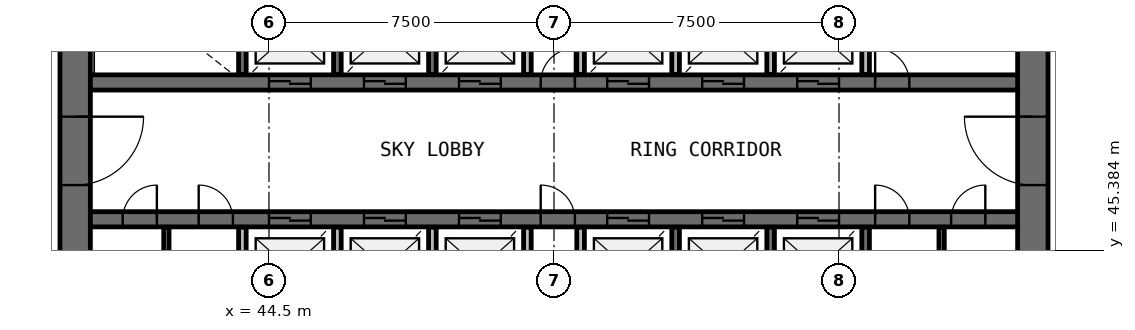
"""IFC4 building model, lengths in metres.
Left out: names, types, materials, properties, quantities, classifications, styles, units other than length and angle.
Written with IfcOpenShell. Run it as: python <this file> out.ifc"""

import sys

from ifc_helpers import new_model, si_unit, direction, frame, frame_2d, origin, place, context, subcontext, project, spatial, rectangle, extrude, source, transform, mapped, element, fill, save


model = new_model("IFC4")
c1 = context("Model", 3, precision=1e-05, world=origin(), true_north=direction((0.0, 1.0)))
c2 = subcontext(c1, "Body", "Model", "MODEL_VIEW")
j1 = project(units=[si_unit("LENGTHUNIT", "METRE"), si_unit("PLANEANGLEUNIT", "RADIAN")], contexts=[c1])
p1 = place(None, origin())
s1 = spatial("IfcSite", under=j1, at=p1, CompositionType="ELEMENT")
p2 = place(p1, origin())
s2 = spatial("IfcBuilding", under=s1, at=p2, CompositionType="ELEMENT")
p3 = place(p2, frame((0.0, 0.0, 133.1)))
s3 = spatial("IfcBuildingStorey", under=s2, at=p3, CompositionType="ELEMENT", Elevation=133.1)
p4 = place(p3, frame((64.6, 38.0, 0.0), z_axis=(0.0, 0.0, 1.0), x_axis=(0.0, 1.0, 0.0)))
e1 = element("IfcWall", 1, at=p4, inside=s3, PredefinedType="SHEAR", context=c2, shape_type="SweptSolid", body=[
    extrude(rectangle(XDim=20.0, YDim=0.8, at=frame_2d((10.0, 0.0))), origin(), (0.0, 0.0, 1.0), 3.9),
])
p5 = place(p4, frame((9.1, 0.0, 0.0)))
e2 = element("IfcOpeningElement", 2, at=p5, cuts=e1, PredefinedType="OPENING", context=c2, shape_type="SweptSolid", body=[
    extrude(rectangle(XDim=1.8, YDim=2.1, at=frame_2d((0.9, 1.05))), frame((0.0, 0.41, 0.0), z_axis=(0.0, -1.0, 0.0), x_axis=(1.0, 0.0, 0.0)), (0.0, 0.0, 1.0), 0.82),
])
p6 = place(p3, frame((39.4, 58.0, 0.0), z_axis=(0.0, 0.0, 1.0), x_axis=(0.0, -1.0, 0.0)))
e3 = element("IfcWall", 3, at=p6, inside=s3, PredefinedType="SHEAR", context=c2, shape_type="SweptSolid", body=[
    extrude(rectangle(XDim=20.0, YDim=0.8, at=frame_2d((10.0, 0.0))), origin(), (0.0, 0.0, 1.0), 3.9),
])
p7 = place(p6, frame((9.1, 0.0, 0.0)))
e4 = element("IfcOpeningElement", 4, at=p7, cuts=e3, PredefinedType="OPENING", context=c2, shape_type="SweptSolid", body=[
    extrude(rectangle(XDim=1.8, YDim=2.1, at=frame_2d((0.9, 1.05))), frame((0.0, 0.41, 0.0), z_axis=(0.0, -1.0, 0.0), x_axis=(1.0, 0.0, 0.0)), (0.0, 0.0, 1.0), 0.82),
])
p8 = place(p3, frame((39.8, 49.8, 0.0), z_axis=(0.0, 0.0, 1.0), x_axis=(1.0, 0.0, 0.0)))
e5 = element("IfcWall", 5, at=p8, inside=s3, PredefinedType="SHEAR", context=c2, shape_type="SweptSolid", body=[
    extrude(rectangle(XDim=24.4, YDim=0.4, at=frame_2d((12.2, 0.0))), origin(), (0.0, 0.0, 1.0), 3.9),
])
p9 = place(p8, frame((13.6, 0.0, 0.0)))
e6 = element("IfcOpeningElement", 6, at=p9, cuts=e5, PredefinedType="OPENING", context=c2, shape_type="SweptSolid", body=[
    extrude(rectangle(XDim=1.1, YDim=2.1, at=frame_2d((0.55, 1.05))), frame((0.0, 0.21, 0.0), z_axis=(0.0, -1.0, 0.0), x_axis=(1.0, 0.0, 0.0)), (0.0, 0.0, 1.0), 0.42),
])
p10 = place(p8, frame((16.1, 0.0, 0.0)))
e7 = element("IfcOpeningElement", 7, at=p10, cuts=e5, PredefinedType="OPENING", context=c2, shape_type="SweptSolid", body=[
    extrude(rectangle(XDim=1.1, YDim=2.1, at=frame_2d((0.55, 1.05))), frame((0.0, 0.21, 0.0), z_axis=(0.0, -1.0, 0.0), x_axis=(1.0, 0.0, 0.0)), (0.0, 0.0, 1.0), 0.42),
])
p11 = place(p8, frame((18.6, 0.0, 0.0)))
e8 = element("IfcOpeningElement", 8, at=p11, cuts=e5, PredefinedType="OPENING", context=c2, shape_type="SweptSolid", body=[
    extrude(rectangle(XDim=1.1, YDim=2.1, at=frame_2d((0.55, 1.05))), frame((0.0, 0.21, 0.0), z_axis=(0.0, -1.0, 0.0), x_axis=(1.0, 0.0, 0.0)), (0.0, 0.0, 1.0), 0.42),
])
p12 = place(p8, frame((4.7, 0.0, 0.0)))
e9 = element("IfcOpeningElement", 9, at=p12, cuts=e5, PredefinedType="OPENING", context=c2, shape_type="SweptSolid", body=[
    extrude(rectangle(XDim=1.1, YDim=2.1, at=frame_2d((0.55, 1.05))), frame((0.0, 0.21, 0.0), z_axis=(0.0, -1.0, 0.0), x_axis=(1.0, 0.0, 0.0)), (0.0, 0.0, 1.0), 0.42),
])
p13 = place(p8, frame((7.2, 0.0, 0.0)))
e10 = element("IfcOpeningElement", 10, at=p13, cuts=e5, PredefinedType="OPENING", context=c2, shape_type="SweptSolid", body=[
    extrude(rectangle(XDim=1.1, YDim=2.1, at=frame_2d((0.55, 1.05))), frame((0.0, 0.21, 0.0), z_axis=(0.0, -1.0, 0.0), x_axis=(1.0, 0.0, 0.0)), (0.0, 0.0, 1.0), 0.42),
])
p14 = place(p8, frame((9.7, 0.0, 0.0)))
e11 = element("IfcOpeningElement", 11, at=p14, cuts=e5, PredefinedType="OPENING", context=c2, shape_type="SweptSolid", body=[
    extrude(rectangle(XDim=1.1, YDim=2.1, at=frame_2d((0.55, 1.05))), frame((0.0, 0.21, 0.0), z_axis=(0.0, -1.0, 0.0), x_axis=(1.0, 0.0, 0.0)), (0.0, 0.0, 1.0), 0.42),
])
p15 = place(p8, frame((20.65, 0.0, 0.0)))
e12 = element("IfcOpeningElement", 12, at=p15, cuts=e5, PredefinedType="OPENING", context=c2, shape_type="SweptSolid", body=[
    extrude(rectangle(XDim=0.9, YDim=2.1, at=frame_2d((0.45, 1.05))), frame((0.0, 0.21, 0.0), z_axis=(0.0, -1.0, 0.0), x_axis=(1.0, 0.0, 0.0)), (0.0, 0.0, 1.0), 0.42),
])
p16 = place(p8, frame((11.85, 0.0, 0.0)))
e13 = element("IfcOpeningElement", 13, at=p16, cuts=e5, PredefinedType="OPENING", context=c2, shape_type="SweptSolid", body=[
    extrude(rectangle(XDim=0.9, YDim=2.1, at=frame_2d((0.45, 1.05))), frame((0.0, 0.21, 0.0), z_axis=(0.0, -1.0, 0.0), x_axis=(1.0, 0.0, 0.0)), (0.0, 0.0, 1.0), 0.42),
])
p17 = place(p3, frame((39.8, 46.2, 0.0), z_axis=(0.0, 0.0, 1.0), x_axis=(1.0, 0.0, 0.0)))
e14 = element("IfcWall", 14, at=p17, inside=s3, PredefinedType="SHEAR", context=c2, shape_type="SweptSolid", body=[
    extrude(rectangle(XDim=24.4, YDim=0.4, at=frame_2d((12.2, 0.0))), origin(), (0.0, 0.0, 1.0), 3.9),
])
p18 = place(p17, frame((13.6, 0.0, 0.0)))
e15 = element("IfcOpeningElement", 15, at=p18, cuts=e14, PredefinedType="OPENING", context=c2, shape_type="SweptSolid", body=[
    extrude(rectangle(XDim=1.1, YDim=2.1, at=frame_2d((0.55, 1.05))), frame((0.0, 0.21, 0.0), z_axis=(0.0, -1.0, 0.0), x_axis=(1.0, 0.0, 0.0)), (0.0, 0.0, 1.0), 0.42),
])
p19 = place(p17, frame((16.1, 0.0, 0.0)))
e16 = element("IfcOpeningElement", 16, at=p19, cuts=e14, PredefinedType="OPENING", context=c2, shape_type="SweptSolid", body=[
    extrude(rectangle(XDim=1.1, YDim=2.1, at=frame_2d((0.55, 1.05))), frame((0.0, 0.21, 0.0), z_axis=(0.0, -1.0, 0.0), x_axis=(1.0, 0.0, 0.0)), (0.0, 0.0, 1.0), 0.42),
])
p20 = place(p17, frame((18.6, 0.0, 0.0)))
e17 = element("IfcOpeningElement", 17, at=p20, cuts=e14, PredefinedType="OPENING", context=c2, shape_type="SweptSolid", body=[
    extrude(rectangle(XDim=1.1, YDim=2.1, at=frame_2d((0.55, 1.05))), frame((0.0, 0.21, 0.0), z_axis=(0.0, -1.0, 0.0), x_axis=(1.0, 0.0, 0.0)), (0.0, 0.0, 1.0), 0.42),
])
p21 = place(p17, frame((4.7, 0.0, 0.0)))
e18 = element("IfcOpeningElement", 18, at=p21, cuts=e14, PredefinedType="OPENING", context=c2, shape_type="SweptSolid", body=[
    extrude(rectangle(XDim=1.1, YDim=2.1, at=frame_2d((0.55, 1.05))), frame((0.0, 0.21, 0.0), z_axis=(0.0, -1.0, 0.0), x_axis=(1.0, 0.0, 0.0)), (0.0, 0.0, 1.0), 0.42),
])
p22 = place(p17, frame((7.2, 0.0, 0.0)))
e19 = element("IfcOpeningElement", 19, at=p22, cuts=e14, PredefinedType="OPENING", context=c2, shape_type="SweptSolid", body=[
    extrude(rectangle(XDim=1.1, YDim=2.1, at=frame_2d((0.55, 1.05))), frame((0.0, 0.21, 0.0), z_axis=(0.0, -1.0, 0.0), x_axis=(1.0, 0.0, 0.0)), (0.0, 0.0, 1.0), 0.42),
])
p23 = place(p17, frame((9.7, 0.0, 0.0)))
e20 = element("IfcOpeningElement", 20, at=p23, cuts=e14, PredefinedType="OPENING", context=c2, shape_type="SweptSolid", body=[
    extrude(rectangle(XDim=1.1, YDim=2.1, at=frame_2d((0.55, 1.05))), frame((0.0, 0.21, 0.0), z_axis=(0.0, -1.0, 0.0), x_axis=(1.0, 0.0, 0.0)), (0.0, 0.0, 1.0), 0.42),
])
p24 = place(p17, frame((20.65, 0.0, 0.0)))
e21 = element("IfcOpeningElement", 21, at=p24, cuts=e14, PredefinedType="OPENING", context=c2, shape_type="SweptSolid", body=[
    extrude(rectangle(XDim=0.9, YDim=2.1, at=frame_2d((0.45, 1.05))), frame((0.0, 0.21, 0.0), z_axis=(0.0, -1.0, 0.0), x_axis=(1.0, 0.0, 0.0)), (0.0, 0.0, 1.0), 0.42),
])
p25 = place(p17, frame((22.65, 0.0, 0.0)))
e22 = element("IfcOpeningElement", 22, at=p25, cuts=e14, PredefinedType="OPENING", context=c2, shape_type="SweptSolid", body=[
    extrude(rectangle(XDim=0.9, YDim=2.1, at=frame_2d((0.45, 1.05))), frame((0.0, 0.21, 0.0), z_axis=(0.0, -1.0, 0.0), x_axis=(1.0, 0.0, 0.0)), (0.0, 0.0, 1.0), 0.42),
])
p26 = place(p17, frame((0.85, 0.0, 0.0)))
e23 = element("IfcOpeningElement", 23, at=p26, cuts=e14, PredefinedType="OPENING", context=c2, shape_type="SweptSolid", body=[
    extrude(rectangle(XDim=0.9, YDim=2.1, at=frame_2d((0.45, 1.05))), frame((0.0, 0.21, 0.0), z_axis=(0.0, -1.0, 0.0), x_axis=(1.0, 0.0, 0.0)), (0.0, 0.0, 1.0), 0.42),
])
p27 = place(p17, frame((2.85, 0.0, 0.0)))
e24 = element("IfcOpeningElement", 24, at=p27, cuts=e14, PredefinedType="OPENING", context=c2, shape_type="SweptSolid", body=[
    extrude(rectangle(XDim=0.9, YDim=2.1, at=frame_2d((0.45, 1.05))), frame((0.0, 0.21, 0.0), z_axis=(0.0, -1.0, 0.0), x_axis=(1.0, 0.0, 0.0)), (0.0, 0.0, 1.0), 0.42),
])
p28 = place(p17, frame((11.85, 0.0, 0.0)))
e25 = element("IfcOpeningElement", 25, at=p28, cuts=e14, PredefinedType="OPENING", context=c2, shape_type="SweptSolid", body=[
    extrude(rectangle(XDim=0.9, YDim=2.1, at=frame_2d((0.45, 1.05))), frame((0.0, 0.21, 0.0), z_axis=(0.0, -1.0, 0.0), x_axis=(1.0, 0.0, 0.0)), (0.0, 0.0, 1.0), 0.42),
])
for number, where, z_axis, x_axis in (
    (26, (43.8, 45.99, 0.0), (0.0, 0.0, 1.0), (0.0, -1.0, 0.0)),
    (27, (43.8, 52.37, 0.0), (0.0, 0.0, 1.0), (0.0, -1.0, 0.0)),
):
    element("IfcWall", number, at=place(p3, frame(where, z_axis=z_axis, x_axis=x_axis)), inside=s3, PredefinedType="SOLIDWALL", context=c2, shape_type="SweptSolid", body=[
        extrude(rectangle(XDim=2.36, YDim=0.2, at=frame_2d((1.18, 0.0))), origin(), (0.0, 0.0, 1.0), 3.58),
    ])
p29 = place(p3, frame((46.3, 43.6, 0.0), z_axis=(0.0, 0.0, 1.0), x_axis=(0.0, 1.0, 0.0)))
e28 = element("IfcWall", 28, at=p29, inside=s3, PredefinedType="SOLIDWALL", context=c2, shape_type="SweptSolid", body=[
    extrude(rectangle(XDim=2.39, YDim=0.2, at=frame_2d((1.195, 0.0))), origin(), (0.0, 0.0, 1.0), 3.58),
])
for number, where, z_axis, x_axis in (
    (29, (46.3, 50.01, 0.0), (0.0, 0.0, 1.0), (0.0, 1.0, 0.0)),
    (30, (48.8, 43.63, 0.0), (0.0, 0.0, 1.0), (0.0, 1.0, 0.0)),
    (31, (48.8, 50.01, 0.0), (0.0, 0.0, 1.0), (0.0, 1.0, 0.0)),
    (32, (51.3, 43.63, 0.0), (0.0, 0.0, 1.0), (0.0, 1.0, 0.0)),
):
    element("IfcWall", number, at=place(p3, frame(where, z_axis=z_axis, x_axis=x_axis)), inside=s3, PredefinedType="SOLIDWALL", context=c2, shape_type="SweptSolid", body=[
        extrude(rectangle(XDim=2.36, YDim=0.2, at=frame_2d((1.18, 0.0))), origin(), (0.0, 0.0, 1.0), 3.58),
    ])
for number, where, z_axis, x_axis in (
    (33, (51.3, 50.01, 0.0), (0.0, 0.0, 1.0), (0.0, 1.0, 0.0)),
    (34, (52.7, 45.99, 0.0), (0.0, 0.0, 1.0), (0.0, -1.0, 0.0)),
):
    element("IfcWall", number, at=place(p3, frame(where, z_axis=z_axis, x_axis=x_axis)), inside=s3, PredefinedType="SOLIDWALL", context=c2, shape_type="SweptSolid", body=[
        extrude(rectangle(XDim=2.39, YDim=0.2, at=frame_2d((1.195, 0.0))), origin(), (0.0, 0.0, 1.0), 3.58),
    ])
for number, where, z_axis, x_axis in (
    (35, (52.7, 52.37, 0.0), (0.0, 0.0, 1.0), (0.0, -1.0, 0.0)),
    (36, (55.2, 43.63, 0.0), (0.0, 0.0, 1.0), (0.0, 1.0, 0.0)),
    (37, (55.2, 50.01, 0.0), (0.0, 0.0, 1.0), (0.0, 1.0, 0.0)),
    (38, (57.7, 43.63, 0.0), (0.0, 0.0, 1.0), (0.0, 1.0, 0.0)),
):
    element("IfcWall", number, at=place(p3, frame(where, z_axis=z_axis, x_axis=x_axis)), inside=s3, PredefinedType="SOLIDWALL", context=c2, shape_type="SweptSolid", body=[
        extrude(rectangle(XDim=2.36, YDim=0.2, at=frame_2d((1.18, 0.0))), origin(), (0.0, 0.0, 1.0), 3.58),
    ])
p30 = place(p3, frame((57.7, 50.01, 0.0), z_axis=(0.0, 0.0, 1.0), x_axis=(0.0, 1.0, 0.0)))
e39 = element("IfcWall", 39, at=p30, inside=s3, PredefinedType="SOLIDWALL", context=c2, shape_type="SweptSolid", body=[
    extrude(rectangle(XDim=2.39, YDim=0.2, at=frame_2d((1.195, 0.0))), origin(), (0.0, 0.0, 1.0), 3.58),
])
for number, where, z_axis, x_axis in (
    (40, (60.2, 43.63, 0.0), (0.0, 0.0, 1.0), (0.0, 1.0, 0.0)),
    (41, (60.2, 50.01, 0.0), (0.0, 0.0, 1.0), (0.0, 1.0, 0.0)),
):
    element("IfcWall", number, at=place(p3, frame(where, z_axis=z_axis, x_axis=x_axis)), inside=s3, PredefinedType="SOLIDWALL", context=c2, shape_type="SweptSolid", body=[
        extrude(rectangle(XDim=2.36, YDim=0.2, at=frame_2d((1.18, 0.0))), origin(), (0.0, 0.0, 1.0), 3.58),
    ])
for number, where, z_axis, x_axis in (
    (42, (41.8, 43.6, 0.0), (0.0, 0.0, 1.0), (0.0, 1.0, 0.0)),
    (43, (62.2, 43.6, 0.0), (0.0, 0.0, 1.0), (0.0, 1.0, 0.0)),
):
    element("IfcWall", number, at=place(p3, frame(where, z_axis=z_axis, x_axis=x_axis)), inside=s3, PredefinedType="PARTITIONING", context=c2, shape_type="SweptSolid", body=[
        extrude(rectangle(XDim=2.39, YDim=0.14, at=frame_2d((1.195, 0.0))), origin(), (0.0, 0.0, 1.0), 2.88),
    ])
m1 = source(origin(), c2, "Body", "SweptSolid", [
    extrude(rectangle(XDim=1.8, YDim=2.1, at=frame_2d((0.9, 1.05))), frame((0.0, 0.025, 0.0), z_axis=(0.0, -1.0, 0.0), x_axis=(1.0, 0.0, 0.0)), (0.0, 0.0, 1.0), 0.05),
])
p31 = place(p7, origin())
e44 = element("IfcDoor", 44, at=p31, inside=s3, OperationType="SINGLE_SWING_LEFT", PredefinedType="DOOR", context=c2, shape_type="MappedRepresentation", body=[
    mapped(m1, transform((0.0, 0.0, 0.0), scale=1.0)),
])
fill(e4, e44)
p32 = place(p5, origin())
e45 = element("IfcDoor", 45, at=p32, inside=s3, OperationType="SINGLE_SWING_RIGHT", PredefinedType="DOOR", context=c2, shape_type="MappedRepresentation", body=[
    mapped(m1, transform((0.0, 0.0, 0.0), scale=1.0)),
])
fill(e2, e45)
m2 = source(origin(), c2, "Body", "SweptSolid", [
    extrude(rectangle(XDim=1.1, YDim=2.1, at=frame_2d((0.55, 1.05))), frame((0.0, 0.025, 0.0), z_axis=(0.0, -1.0, 0.0), x_axis=(1.0, 0.0, 0.0)), (0.0, 0.0, 1.0), 0.05),
])
p33 = place(p9, origin())
e46 = element("IfcDoor", 46, at=p33, inside=s3, OperationType="DOUBLE_DOOR_SLIDING", PredefinedType="USERDEFINED", context=c2, shape_type="MappedRepresentation", body=[
    mapped(m2, transform((0.0, 0.0, 0.0), scale=1.0)),
])
fill(e6, e46)
p34 = place(p10, origin())
e47 = element("IfcDoor", 47, at=p34, inside=s3, OperationType="DOUBLE_DOOR_SLIDING", PredefinedType="USERDEFINED", context=c2, shape_type="MappedRepresentation", body=[
    mapped(m2, transform((0.0, 0.0, 0.0), scale=1.0)),
])
fill(e7, e47)
p35 = place(p11, origin())
e48 = element("IfcDoor", 48, at=p35, inside=s3, OperationType="DOUBLE_DOOR_SLIDING", PredefinedType="USERDEFINED", context=c2, shape_type="MappedRepresentation", body=[
    mapped(m2, transform((0.0, 0.0, 0.0), scale=1.0)),
])
fill(e8, e48)
p36 = place(p18, origin())
e49 = element("IfcDoor", 49, at=p36, inside=s3, OperationType="DOUBLE_DOOR_SLIDING", PredefinedType="USERDEFINED", context=c2, shape_type="MappedRepresentation", body=[
    mapped(m2, transform((0.0, 0.0, 0.0), scale=1.0)),
])
fill(e15, e49)
p37 = place(p19, origin())
e50 = element("IfcDoor", 50, at=p37, inside=s3, OperationType="DOUBLE_DOOR_SLIDING", PredefinedType="USERDEFINED", context=c2, shape_type="MappedRepresentation", body=[
    mapped(m2, transform((0.0, 0.0, 0.0), scale=1.0)),
])
fill(e16, e50)
p38 = place(p20, origin())
e51 = element("IfcDoor", 51, at=p38, inside=s3, OperationType="DOUBLE_DOOR_SLIDING", PredefinedType="USERDEFINED", context=c2, shape_type="MappedRepresentation", body=[
    mapped(m2, transform((0.0, 0.0, 0.0), scale=1.0)),
])
fill(e17, e51)
p39 = place(p12, origin())
e52 = element("IfcDoor", 52, at=p39, inside=s3, OperationType="DOUBLE_DOOR_SLIDING", PredefinedType="USERDEFINED", context=c2, shape_type="MappedRepresentation", body=[
    mapped(m2, transform((0.0, 0.0, 0.0), scale=1.0)),
])
fill(e9, e52)
p40 = place(p13, origin())
e53 = element("IfcDoor", 53, at=p40, inside=s3, OperationType="DOUBLE_DOOR_SLIDING", PredefinedType="USERDEFINED", context=c2, shape_type="MappedRepresentation", body=[
    mapped(m2, transform((0.0, 0.0, 0.0), scale=1.0)),
])
fill(e10, e53)
p41 = place(p14, origin())
e54 = element("IfcDoor", 54, at=p41, inside=s3, OperationType="DOUBLE_DOOR_SLIDING", PredefinedType="USERDEFINED", context=c2, shape_type="MappedRepresentation", body=[
    mapped(m2, transform((0.0, 0.0, 0.0), scale=1.0)),
])
fill(e11, e54)
p42 = place(p21, origin())
e55 = element("IfcDoor", 55, at=p42, inside=s3, OperationType="DOUBLE_DOOR_SLIDING", PredefinedType="USERDEFINED", context=c2, shape_type="MappedRepresentation", body=[
    mapped(m2, transform((0.0, 0.0, 0.0), scale=1.0)),
])
fill(e18, e55)
p43 = place(p22, origin())
e56 = element("IfcDoor", 56, at=p43, inside=s3, OperationType="DOUBLE_DOOR_SLIDING", PredefinedType="USERDEFINED", context=c2, shape_type="MappedRepresentation", body=[
    mapped(m2, transform((0.0, 0.0, 0.0), scale=1.0)),
])
fill(e19, e56)
p44 = place(p23, origin())
e57 = element("IfcDoor", 57, at=p44, inside=s3, OperationType="DOUBLE_DOOR_SLIDING", PredefinedType="USERDEFINED", context=c2, shape_type="MappedRepresentation", body=[
    mapped(m2, transform((0.0, 0.0, 0.0), scale=1.0)),
])
fill(e20, e57)
m3 = source(origin(), c2, "Body", "SweptSolid", [
    extrude(rectangle(XDim=0.9, YDim=2.1, at=frame_2d((0.45, 1.05))), frame((0.0, 0.025, 0.0), z_axis=(0.0, -1.0, 0.0), x_axis=(1.0, 0.0, 0.0)), (0.0, 0.0, 1.0), 0.05),
])
p45 = place(p24, origin())
e58 = element("IfcDoor", 58, at=p45, inside=s3, OperationType="SINGLE_SWING_LEFT", PredefinedType="DOOR", context=c2, shape_type="MappedRepresentation", body=[
    mapped(m3, transform((0.0, 0.0, 0.0), scale=1.0)),
])
fill(e21, e58)
p46 = place(p25, origin())
e59 = element("IfcDoor", 59, at=p46, inside=s3, OperationType="SINGLE_SWING_RIGHT", PredefinedType="DOOR", context=c2, shape_type="MappedRepresentation", body=[
    mapped(m3, transform((0.0, 0.0, 0.0), scale=1.0)),
])
fill(e22, e59)
p47 = place(p15, origin())
e60 = element("IfcDoor", 60, at=p47, inside=s3, OperationType="SINGLE_SWING_LEFT", PredefinedType="DOOR", context=c2, shape_type="MappedRepresentation", body=[
    mapped(m3, transform((0.0, 0.0, 0.0), scale=1.0)),
])
fill(e12, e60)
p48 = place(p26, origin())
e61 = element("IfcDoor", 61, at=p48, inside=s3, OperationType="SINGLE_SWING_RIGHT", PredefinedType="DOOR", context=c2, shape_type="MappedRepresentation", body=[
    mapped(m3, transform((0.0, 0.0, 0.0), scale=1.0)),
])
fill(e23, e61)
p49 = place(p27, origin())
e62 = element("IfcDoor", 62, at=p49, inside=s3, OperationType="SINGLE_SWING_LEFT", PredefinedType="DOOR", context=c2, shape_type="MappedRepresentation", body=[
    mapped(m3, transform((0.0, 0.0, 0.0), scale=1.0)),
])
fill(e24, e62)
p50 = place(p16, origin())
e63 = element("IfcDoor", 63, at=p50, inside=s3, OperationType="SINGLE_SWING_RIGHT", PredefinedType="DOOR", context=c2, shape_type="MappedRepresentation", body=[
    mapped(m3, transform((0.0, 0.0, 0.0), scale=1.0)),
])
fill(e13, e63)
p51 = place(p28, origin())
e64 = element("IfcDoor", 64, at=p51, inside=s3, OperationType="SINGLE_SWING_LEFT", PredefinedType="DOOR", context=c2, shape_type="MappedRepresentation", body=[
    mapped(m3, transform((0.0, 0.0, 0.0), scale=1.0)),
])
fill(e25, e64)
save(model, sys.argv[1])
